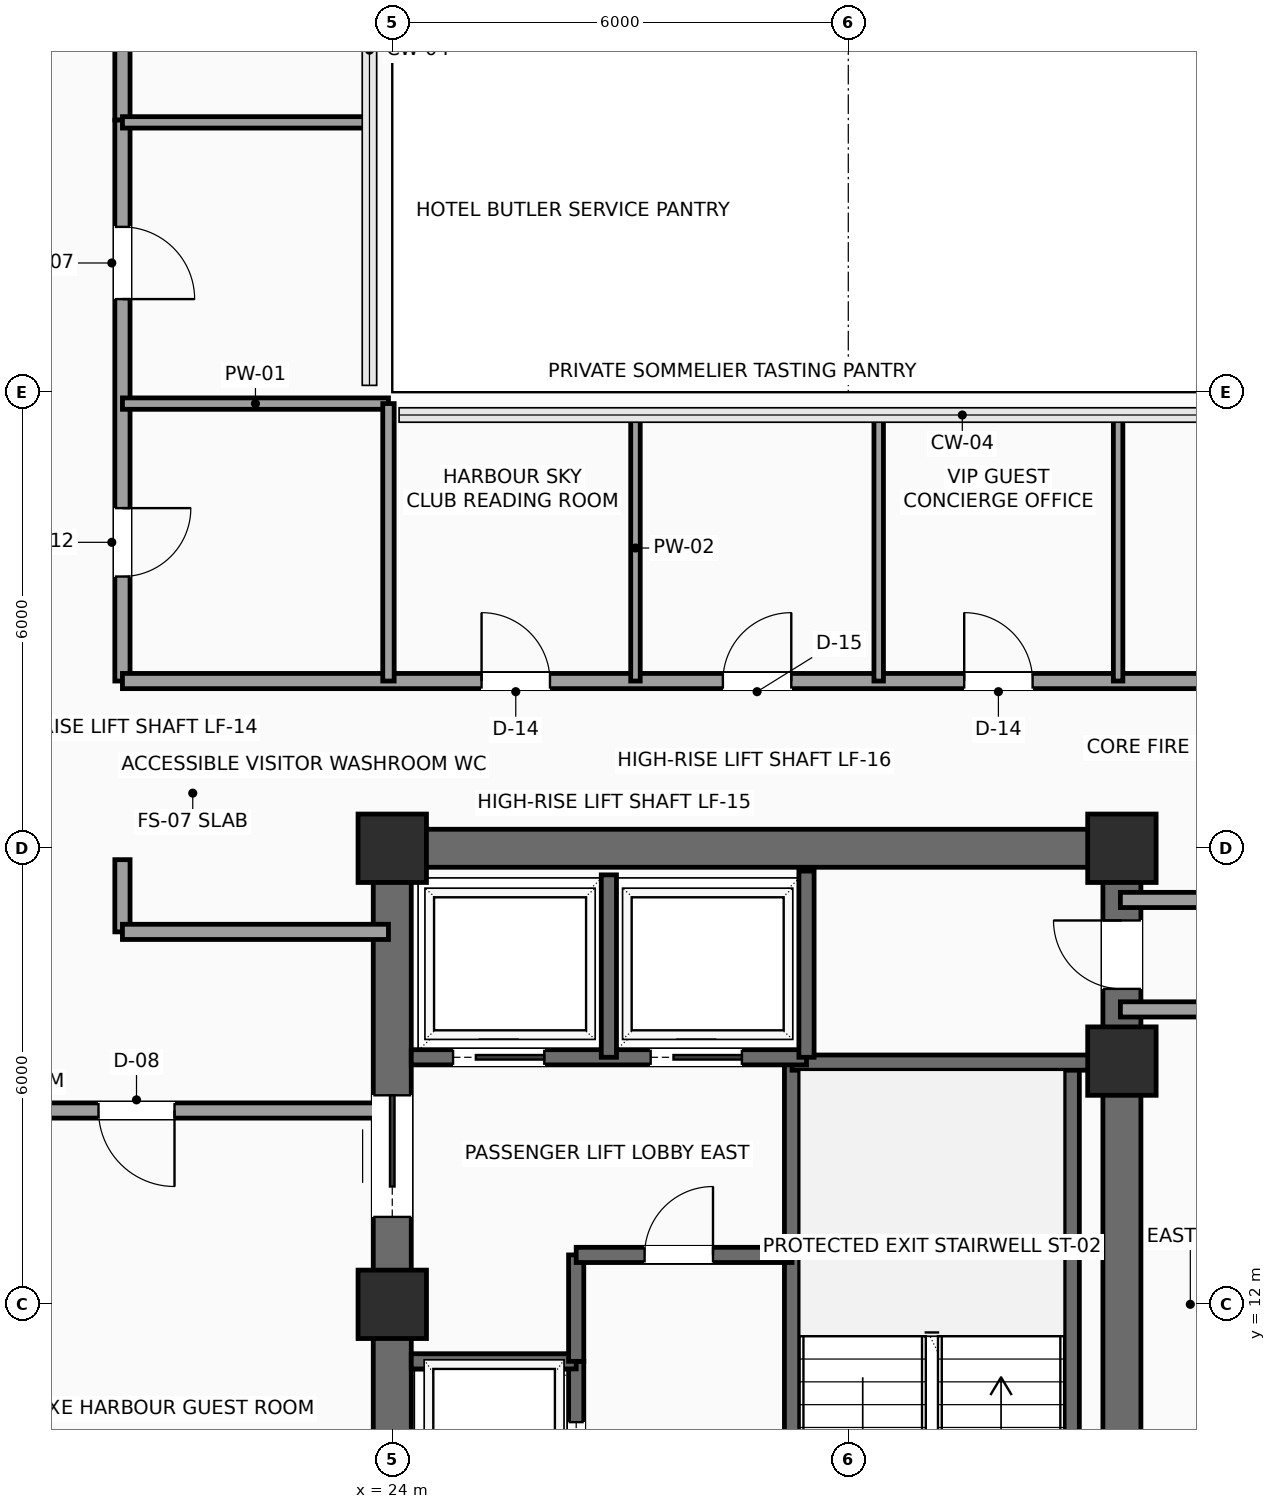
"""IFC4 building model, lengths in metres.
Left out: names, types, materials, properties, quantities, classifications, styles, units other than length and angle.
Written with IfcOpenShell. Run it as: python <this file> out.ifc"""

import sys

from ifc_helpers import new_model, si_unit, direction, frame, frame_2d, origin, origin_2d, place, context, subcontext, project, spatial, rectangle, extrude, element, fill, save


model = new_model("IFC4")
c1 = context("Model", 3, precision=1e-05, world=origin(), true_north=direction((0.0, 1.0)))
c2 = subcontext(c1, "Body", "Model", "MODEL_VIEW")
j1 = project(units=[si_unit("LENGTHUNIT", "METRE"), si_unit("PLANEANGLEUNIT", "RADIAN")], contexts=[c1])
p1 = place(None, origin())
s1 = spatial("IfcSite", under=j1, at=p1, CompositionType="ELEMENT")
p2 = place(p1, origin())
s2 = spatial("IfcBuilding", under=s1, at=p2, CompositionType="ELEMENT")
p3 = place(p2, frame((0.0, 0.0, 212.4)))
s3 = spatial("IfcBuildingStorey", under=s2, at=p3, CompositionType="ELEMENT", Elevation=212.4)
for number, where, z_axis, x_axis in (
    (1, (24.0, 12.0, 0.0), (0.0, 0.0, 1.0), (1.0, 0.0, 0.0)),
    (2, (24.0, 18.0, 0.0), (0.0, 0.0, 1.0), (1.0, 0.0, 0.0)),
    (3, (33.6, 15.2, 0.0), (0.0, 0.0, 1.0), (1.0, 0.0, 0.0)),
    (4, (33.6, 18.0, 0.0), (0.0, 0.0, 1.0), (1.0, 0.0, 0.0)),
):
    element("IfcColumn", number, at=place(p3, frame(where, z_axis=z_axis, x_axis=x_axis)), inside=s3, PredefinedType="COLUMN", context=c2, shape_type="SweptSolid", body=[
        extrude(rectangle(XDim=0.9, YDim=0.9, at=origin_2d()), origin(), (0.0, 0.0, 1.0), 3.75),
    ])
p4 = place(p3, frame((24.0, 18.0, 0.0), z_axis=(0.0, 0.0, 1.0), x_axis=(1.0, 0.0, 0.0)))
e5 = element("IfcWall", 5, at=p4, inside=s3, PredefinedType="SHEAR", context=c2, shape_type="SweptSolid", body=[
    extrude(rectangle(XDim=9.6, YDim=0.5, at=frame_2d((4.8, 0.0))), origin(), (0.0, 0.0, 1.0), 3.54),
])
p5 = place(p3, frame((24.0, 6.0, 0.0), z_axis=(0.0, 0.0, 1.0), x_axis=(0.0, 1.0, 0.0)))
e6 = element("IfcWall", 6, at=p5, inside=s3, PredefinedType="SHEAR", context=c2, shape_type="SweptSolid", body=[
    extrude(rectangle(XDim=12.0, YDim=0.5, at=frame_2d((6.0, 0.0))), origin(), (0.0, 0.0, 1.0), 3.54),
])
p6 = place(p5, frame((7.15, 0.0, 0.0)))
e7 = element("IfcOpeningElement", 7, at=p6, cuts=e6, PredefinedType="OPENING", context=c2, shape_type="SweptSolid", body=[
    extrude(rectangle(XDim=1.6, YDim=2.3, at=frame_2d((0.8, 1.15))), frame((0.0, 0.26, 0.0), z_axis=(0.0, -1.0, 0.0), x_axis=(1.0, 0.0, 0.0)), (0.0, 0.0, 1.0), 0.52),
])
p7 = place(p3, frame((33.6, 6.0, 0.0), z_axis=(0.0, 0.0, 1.0), x_axis=(0.0, 1.0, 0.0)))
e8 = element("IfcWall", 8, at=p7, inside=s3, PredefinedType="SHEAR", context=c2, shape_type="SweptSolid", body=[
    extrude(rectangle(XDim=12.0, YDim=0.5, at=frame_2d((6.0, 0.0))), origin(), (0.0, 0.0, 1.0), 3.54),
])
p8 = place(p7, frame((10.15, 0.0, 0.0)))
e9 = element("IfcOpeningElement", 9, at=p8, cuts=e8, PredefinedType="OPENING", context=c2, shape_type="SweptSolid", body=[
    extrude(rectangle(XDim=0.9, YDim=2.15, at=frame_2d((0.45, 1.075))), frame((0.0, 0.26, 0.0), z_axis=(0.0, -1.0, 0.0), x_axis=(1.0, 0.0, 0.0)), (0.0, 0.0, 1.0), 0.52),
])
p9 = place(p3, frame((29.26, 6.3, 0.0), z_axis=(0.0, 0.0, 1.0), x_axis=(0.0, 1.0, 0.0)))
e10 = element("IfcWall", 10, at=p9, inside=s3, PredefinedType="SHEAR", context=c2, shape_type="SweptSolid", body=[
    extrude(rectangle(XDim=8.88, YDim=0.2, at=frame_2d((4.44, 0.0))), origin(), (0.0, 0.0, 1.0), 3.54),
])
p10 = place(p9, frame((0.35, 0.0, 0.0)))
e11 = element("IfcOpeningElement", 11, at=p10, cuts=e10, PredefinedType="OPENING", context=c2, shape_type="SweptSolid", body=[
    extrude(rectangle(XDim=1.1, YDim=2.2, at=frame_2d((0.55, 1.1))), frame((0.0, 0.11, 0.0), z_axis=(0.0, -1.0, 0.0), x_axis=(1.0, 0.0, 0.0)), (0.0, 0.0, 1.0), 0.22),
])
p11 = place(p3, frame((32.94, 6.3, 0.0), z_axis=(0.0, 0.0, 1.0), x_axis=(0.0, 1.0, 0.0)))
e12 = element("IfcWall", 12, at=p11, inside=s3, PredefinedType="SHEAR", context=c2, shape_type="SweptSolid", body=[
    extrude(rectangle(XDim=8.88, YDim=0.2, at=frame_2d((4.44, 0.0))), origin(), (0.0, 0.0, 1.0), 3.54),
])
p12 = place(p3, frame((29.26, 15.18, 0.0), z_axis=(0.0, 0.0, 1.0), x_axis=(1.0, 0.0, 0.0)))
e13 = element("IfcWall", 13, at=p12, inside=s3, PredefinedType="SHEAR", context=c2, shape_type="SweptSolid", body=[
    extrude(rectangle(XDim=4.04, YDim=0.2, at=frame_2d((2.02, 0.0))), origin(), (0.0, 0.0, 1.0), 3.54),
])
p13 = place(p3, frame((26.42, 6.3, 0.0), z_axis=(0.0, 0.0, 1.0), x_axis=(0.0, 1.0, 0.0)))
e14 = element("IfcWall", 14, at=p13, inside=s3, PredefinedType="SHEAR", context=c2, shape_type="SweptSolid", body=[
    extrude(rectangle(XDim=4.95, YDim=0.2, at=frame_2d((2.475, 0.0))), origin(), (0.0, 0.0, 1.0), 3.54),
])
p14 = place(p13, frame((0.65, 0.0, 0.0)))
e15 = element("IfcOpeningElement", 15, at=p14, cuts=e14, PredefinedType="OPENING", context=c2, shape_type="SweptSolid", body=[
    extrude(rectangle(XDim=1.1, YDim=2.2, at=frame_2d((0.55, 1.1))), frame((0.0, 0.11, 0.0), z_axis=(0.0, -1.0, 0.0), x_axis=(1.0, 0.0, 0.0)), (0.0, 0.0, 1.0), 0.22),
])
p15 = place(p13, frame((3.05, 0.0, 0.0)))
e16 = element("IfcOpeningElement", 16, at=p15, cuts=e14, PredefinedType="OPENING", context=c2, shape_type="SweptSolid", body=[
    extrude(rectangle(XDim=1.1, YDim=2.2, at=frame_2d((0.55, 1.1))), frame((0.0, 0.11, 0.0), z_axis=(0.0, -1.0, 0.0), x_axis=(1.0, 0.0, 0.0)), (0.0, 0.0, 1.0), 0.22),
])
p16 = place(p3, frame((24.25, 11.25, 0.0), z_axis=(0.0, 0.0, 1.0), x_axis=(1.0, 0.0, 0.0)))
e17 = element("IfcWall", 17, at=p16, inside=s3, PredefinedType="SHEAR", context=c2, shape_type="SweptSolid", body=[
    extrude(rectangle(XDim=2.17, YDim=0.2, at=frame_2d((1.085, 0.0))), origin(), (0.0, 0.0, 1.0), 3.54),
])
p17 = place(p3, frame((26.42, 11.25, 0.0), z_axis=(0.0, 0.0, 1.0), x_axis=(0.0, 1.0, 0.0)))
e18 = element("IfcWall", 18, at=p17, inside=s3, PredefinedType="SHEAR", context=c2, shape_type="SweptSolid", body=[
    extrude(rectangle(XDim=1.4, YDim=0.2, at=frame_2d((0.7, 0.0))), origin(), (0.0, 0.0, 1.0), 3.54),
])
p18 = place(p3, frame((26.42, 12.65, 0.0), z_axis=(0.0, 0.0, 1.0), x_axis=(1.0, 0.0, 0.0)))
e19 = element("IfcWall", 19, at=p18, inside=s3, PredefinedType="SHEAR", context=c2, shape_type="SweptSolid", body=[
    extrude(rectangle(XDim=2.84, YDim=0.2, at=frame_2d((1.42, 0.0))), origin(), (0.0, 0.0, 1.0), 3.54),
])
p19 = place(p18, frame((0.9, 0.0, 0.0)))
e20 = element("IfcOpeningElement", 20, at=p19, cuts=e19, PredefinedType="OPENING", context=c2, shape_type="SweptSolid", body=[
    extrude(rectangle(XDim=0.9, YDim=2.15, at=frame_2d((0.45, 1.075))), frame((0.0, 0.11, 0.0), z_axis=(0.0, -1.0, 0.0), x_axis=(1.0, 0.0, 0.0)), (0.0, 0.0, 1.0), 0.22),
])
p20 = place(p3, frame((24.25, 15.25, 0.0), z_axis=(0.0, 0.0, 1.0), x_axis=(1.0, 0.0, 0.0)))
e21 = element("IfcWall", 21, at=p20, inside=s3, PredefinedType="SHEAR", context=c2, shape_type="SweptSolid", body=[
    extrude(rectangle(XDim=5.2, YDim=0.2, at=frame_2d((2.6, 0.0))), origin(), (0.0, 0.0, 1.0), 3.54),
])
p21 = place(p20, frame((0.55, 0.0, 0.0)))
e22 = element("IfcOpeningElement", 22, at=p21, cuts=e21, PredefinedType="OPENING", context=c2, shape_type="SweptSolid", body=[
    extrude(rectangle(XDim=1.2, YDim=2.2, at=frame_2d((0.6, 1.1))), frame((0.0, 0.11, 0.0), z_axis=(0.0, -1.0, 0.0), x_axis=(1.0, 0.0, 0.0)), (0.0, 0.0, 1.0), 0.22),
])
p22 = place(p20, frame((3.15, 0.0, 0.0)))
e23 = element("IfcOpeningElement", 23, at=p22, cuts=e21, PredefinedType="OPENING", context=c2, shape_type="SweptSolid", body=[
    extrude(rectangle(XDim=1.2, YDim=2.2, at=frame_2d((0.6, 1.1))), frame((0.0, 0.11, 0.0), z_axis=(0.0, -1.0, 0.0), x_axis=(1.0, 0.0, 0.0)), (0.0, 0.0, 1.0), 0.22),
])
p23 = place(p3, frame((26.85, 15.25, 0.0), z_axis=(0.0, 0.0, 1.0), x_axis=(0.0, 1.0, 0.0)))
e24 = element("IfcWall", 24, at=p23, inside=s3, PredefinedType="SHEAR", context=c2, shape_type="SweptSolid", body=[
    extrude(rectangle(XDim=2.4, YDim=0.2, at=frame_2d((1.2, 0.0))), origin(), (0.0, 0.0, 1.0), 3.54),
])
p24 = place(p3, frame((29.45, 15.25, 0.0), z_axis=(0.0, 0.0, 1.0), x_axis=(0.0, 1.0, 0.0)))
e25 = element("IfcWall", 25, at=p24, inside=s3, PredefinedType="SHEAR", context=c2, shape_type="SweptSolid", body=[
    extrude(rectangle(XDim=2.45, YDim=0.2, at=frame_2d((1.225, 0.0))), origin(), (0.0, 0.0, 1.0), 3.54),
])
p25 = place(p3, frame((20.45, 30.25, 0.0), z_axis=(0.0, 0.0, 1.0), x_axis=(0.0, -1.0, 0.0)))
e26 = element("IfcWall", 26, at=p25, inside=s3, PredefinedType="PARTITIONING", context=c2, shape_type="SweptSolid", body=[
    extrude(rectangle(XDim=2.67, YDim=0.2, at=frame_2d((1.335, 0.0))), origin(), (0.0, 0.0, 1.0), 3.54),
])
p26 = place(p3, frame((20.45, 27.58, 0.0), z_axis=(0.0, 0.0, 1.0), x_axis=(0.0, -1.0, 0.0)))
e27 = element("IfcWall", 27, at=p26, inside=s3, PredefinedType="PARTITIONING", context=c2, shape_type="SweptSolid", body=[
    extrude(rectangle(XDim=7.38, YDim=0.2, at=frame_2d((3.69, 0.0))), origin(), (0.0, 0.0, 1.0), 3.54),
])
p27 = place(p26, frame((5.105, 0.0, 0.0)))
e28 = element("IfcOpeningElement", 28, at=p27, cuts=e27, PredefinedType="OPENING", context=c2, shape_type="SweptSolid", body=[
    extrude(rectangle(XDim=0.9, YDim=2.1, at=frame_2d((0.45, 1.05))), frame((0.0, 0.11, 0.0), z_axis=(0.0, -1.0, 0.0), x_axis=(1.0, 0.0, 0.0)), (0.0, 0.0, 1.0), 0.22),
])
p28 = place(p26, frame((1.405, 0.0, 0.0)))
e29 = element("IfcOpeningElement", 29, at=p28, cuts=e27, PredefinedType="OPENING", context=c2, shape_type="SweptSolid", body=[
    extrude(rectangle(XDim=0.95, YDim=2.15, at=frame_2d((0.475, 1.075))), frame((0.0, 0.11, 0.0), z_axis=(0.0, -1.0, 0.0), x_axis=(1.0, 0.0, 0.0)), (0.0, 0.0, 1.0), 0.22),
])
p29 = place(p3, frame((20.45, 20.2, 0.0), z_axis=(0.0, 0.0, 1.0), x_axis=(1.0, 0.0, 0.0)))
e30 = element("IfcWall", 30, at=p29, inside=s3, PredefinedType="PARTITIONING", context=c2, shape_type="SweptSolid", body=[
    extrude(rectangle(XDim=15.7, YDim=0.2, at=frame_2d((7.85, 0.0))), origin(), (0.0, 0.0, 1.0), 3.54),
])
p30 = place(p29, frame((4.725, 0.0, 0.0)))
e31 = element("IfcOpeningElement", 31, at=p30, cuts=e30, PredefinedType="OPENING", context=c2, shape_type="SweptSolid", body=[
    extrude(rectangle(XDim=0.9, YDim=2.1, at=frame_2d((0.45, 1.05))), frame((0.0, 0.11, 0.0), z_axis=(0.0, -1.0, 0.0), x_axis=(1.0, 0.0, 0.0)), (0.0, 0.0, 1.0), 0.22),
])
p31 = place(p29, frame((7.9, 0.0, 0.0)))
e32 = element("IfcOpeningElement", 32, at=p31, cuts=e30, PredefinedType="OPENING", context=c2, shape_type="SweptSolid", body=[
    extrude(rectangle(XDim=0.9, YDim=2.1, at=frame_2d((0.45, 1.05))), frame((0.0, 0.11, 0.0), z_axis=(0.0, -1.0, 0.0), x_axis=(1.0, 0.0, 0.0)), (0.0, 0.0, 1.0), 0.22),
])
p32 = place(p29, frame((11.075, 0.0, 0.0)))
e33 = element("IfcOpeningElement", 33, at=p32, cuts=e30, PredefinedType="OPENING", context=c2, shape_type="SweptSolid", body=[
    extrude(rectangle(XDim=0.9, YDim=2.1, at=frame_2d((0.45, 1.05))), frame((0.0, 0.11, 0.0), z_axis=(0.0, -1.0, 0.0), x_axis=(1.0, 0.0, 0.0)), (0.0, 0.0, 1.0), 0.22),
])
for number, where, z_axis, x_axis in (
    (34, (36.15, 15.88, 0.0), (0.0, 0.0, 1.0), (-1.0, 0.0, 0.0)),
    (35, (33.58, 17.32, 0.0), (0.0, 0.0, 1.0), (1.0, 0.0, 0.0)),
):
    element("IfcWall", number, at=place(p3, frame(where, z_axis=z_axis, x_axis=x_axis)), inside=s3, PredefinedType="PARTITIONING", context=c2, shape_type="SweptSolid", body=[
        extrude(rectangle(XDim=2.57, YDim=0.2, at=frame_2d((1.285, 0.0))), origin(), (0.0, 0.0, 1.0), 3.54),
    ])
p33 = place(p3, frame((20.45, 17.85, 0.0), z_axis=(0.0, 0.0, 1.0), x_axis=(0.0, -1.0, 0.0)))
e36 = element("IfcWall", 36, at=p33, inside=s3, PredefinedType="PARTITIONING", context=c2, shape_type="SweptSolid", body=[
    extrude(rectangle(XDim=0.95, YDim=0.2, at=frame_2d((0.475, 0.0))), origin(), (0.0, 0.0, 1.0), 3.54),
])
p34 = place(p3, frame((20.45, 16.9, 0.0), z_axis=(0.0, 0.0, 1.0), x_axis=(1.0, 0.0, 0.0)))
e37 = element("IfcWall", 37, at=p34, inside=s3, PredefinedType="PARTITIONING", context=c2, shape_type="SweptSolid", body=[
    extrude(rectangle(XDim=3.5, YDim=0.2, at=frame_2d((1.75, 0.0))), origin(), (0.0, 0.0, 1.0), 3.54),
])
p35 = place(p3, frame((23.95, 14.55, 0.0), z_axis=(0.0, 0.0, 1.0), x_axis=(-1.0, 0.0, 0.0)))
e38 = element("IfcWall", 38, at=p35, inside=s3, PredefinedType="PARTITIONING", context=c2, shape_type="SweptSolid", body=[
    extrude(rectangle(XDim=9.0, YDim=0.2, at=frame_2d((4.5, 0.0))), origin(), (0.0, 0.0, 1.0), 3.54),
])
p36 = place(p35, frame((2.815, 0.0, 0.0)))
e39 = element("IfcOpeningElement", 39, at=p36, cuts=e38, PredefinedType="OPENING", context=c2, shape_type="SweptSolid", body=[
    extrude(rectangle(XDim=1.0, YDim=2.2, at=frame_2d((0.5, 1.1))), frame((0.0, 0.11, 0.0), z_axis=(0.0, -1.0, 0.0), x_axis=(1.0, 0.0, 0.0)), (0.0, 0.0, 1.0), 0.22),
])
p37 = place(p3, frame((20.45, 23.85, 0.0), z_axis=(0.0, 0.0, 1.0), x_axis=(1.0, 0.0, 0.0)))
e40 = element("IfcWall", 40, at=p37, inside=s3, PredefinedType="PARTITIONING", context=c2, shape_type="SweptSolid", body=[
    extrude(rectangle(XDim=3.5, YDim=0.15, at=frame_2d((1.75, 0.0))), origin(), (0.0, 0.0, 1.0), 3.54),
])
p38 = place(p3, frame((23.95, 20.2, 0.0), z_axis=(0.0, 0.0, 1.0), x_axis=(0.0, 1.0, 0.0)))
e41 = element("IfcWall", 41, at=p38, inside=s3, PredefinedType="PARTITIONING", context=c2, shape_type="SweptSolid", body=[
    extrude(rectangle(XDim=3.65, YDim=0.15, at=frame_2d((1.825, 0.0))), origin(), (0.0, 0.0, 1.0), 3.54),
])
p39 = place(p3, frame((20.45, 27.55, 0.0), z_axis=(0.0, 0.0, 1.0), x_axis=(1.0, 0.0, 0.0)))
e42 = element("IfcWall", 42, at=p39, inside=s3, PredefinedType="PARTITIONING", context=c2, shape_type="SweptSolid", body=[
    extrude(rectangle(XDim=3.25, YDim=0.15, at=frame_2d((1.625, 0.0))), origin(), (0.0, 0.0, 1.0), 3.54),
])
for number, where, z_axis, x_axis in (
    (43, (27.2, 20.2, 0.0), (0.0, 0.0, 1.0), (0.0, 1.0, 0.0)),
    (44, (30.4, 20.2, 0.0), (0.0, 0.0, 1.0), (0.0, 1.0, 0.0)),
    (45, (33.55, 20.2, 0.0), (0.0, 0.0, 1.0), (0.0, 1.0, 0.0)),
):
    element("IfcWall", number, at=place(p3, frame(where, z_axis=z_axis, x_axis=x_axis)), inside=s3, PredefinedType="PARTITIONING", context=c2, shape_type="SweptSolid", body=[
        extrude(rectangle(XDim=3.5, YDim=0.125, at=frame_2d((1.75, 0.0))), origin(), (0.0, 0.0, 1.0), 3.54),
    ])
p40 = place(p6, origin())
e46 = element("IfcDoor", 46, at=p40, inside=s3, OperationType="DOUBLE_DOOR_SLIDING", PredefinedType="DOOR", context=c2, shape_type="SweptSolid", body=[
    extrude(rectangle(XDim=1.6, YDim=2.3, at=frame_2d((0.8, 1.15))), frame((0.0, 0.025, 0.0), z_axis=(0.0, -1.0, 0.0), x_axis=(1.0, 0.0, 0.0)), (0.0, 0.0, 1.0), 0.05),
])
fill(e7, e46)
p41 = place(p8, origin())
e47 = element("IfcDoor", 47, at=p41, inside=s3, OperationType="SINGLE_SWING_RIGHT", PredefinedType="DOOR", context=c2, shape_type="SweptSolid", body=[
    extrude(rectangle(XDim=0.9, YDim=2.15, at=frame_2d((0.45, 1.075))), frame((0.0, 0.025, 0.0), z_axis=(0.0, -1.0, 0.0), x_axis=(1.0, 0.0, 0.0)), (0.0, 0.0, 1.0), 0.05),
])
fill(e9, e47)
p42 = place(p15, origin())
e48 = element("IfcDoor", 48, at=p42, inside=s3, OperationType="SLIDING_TO_LEFT", PredefinedType="DOOR", context=c2, shape_type="SweptSolid", body=[
    extrude(rectangle(XDim=1.1, YDim=2.2, at=frame_2d((0.55, 1.1))), frame((0.0, 0.025, 0.0), z_axis=(0.0, -1.0, 0.0), x_axis=(1.0, 0.0, 0.0)), (0.0, 0.0, 1.0), 0.05),
])
fill(e16, e48)
p43 = place(p19, origin())
e49 = element("IfcDoor", 49, at=p43, inside=s3, OperationType="SINGLE_SWING_RIGHT", PredefinedType="DOOR", context=c2, shape_type="SweptSolid", body=[
    extrude(rectangle(XDim=0.9, YDim=2.15, at=frame_2d((0.45, 1.075))), frame((0.0, 0.025, 0.0), z_axis=(0.0, -1.0, 0.0), x_axis=(1.0, 0.0, 0.0)), (0.0, 0.0, 1.0), 0.05),
])
fill(e20, e49)
p44 = place(p21, origin())
e50 = element("IfcDoor", 50, at=p44, inside=s3, OperationType="SLIDING_TO_RIGHT", PredefinedType="DOOR", context=c2, shape_type="SweptSolid", body=[
    extrude(rectangle(XDim=1.2, YDim=2.2, at=frame_2d((0.6, 1.1))), frame((0.0, 0.025, 0.0), z_axis=(0.0, -1.0, 0.0), x_axis=(1.0, 0.0, 0.0)), (0.0, 0.0, 1.0), 0.05),
])
fill(e22, e50)
p45 = place(p22, origin())
e51 = element("IfcDoor", 51, at=p45, inside=s3, OperationType="SLIDING_TO_RIGHT", PredefinedType="DOOR", context=c2, shape_type="SweptSolid", body=[
    extrude(rectangle(XDim=1.2, YDim=2.2, at=frame_2d((0.6, 1.1))), frame((0.0, 0.025, 0.0), z_axis=(0.0, -1.0, 0.0), x_axis=(1.0, 0.0, 0.0)), (0.0, 0.0, 1.0), 0.05),
])
fill(e23, e51)
p46 = place(p27, origin())
e52 = element("IfcDoor", 52, at=p46, inside=s3, OperationType="SINGLE_SWING_LEFT", PredefinedType="DOOR", context=c2, shape_type="SweptSolid", body=[
    extrude(rectangle(XDim=0.9, YDim=2.1, at=frame_2d((0.45, 1.05))), frame((0.0, 0.025, 0.0), z_axis=(0.0, -1.0, 0.0), x_axis=(1.0, 0.0, 0.0)), (0.0, 0.0, 1.0), 0.05),
])
fill(e28, e52)
p47 = place(p28, origin())
e53 = element("IfcDoor", 53, at=p47, inside=s3, OperationType="SINGLE_SWING_RIGHT", PredefinedType="DOOR", context=c2, shape_type="SweptSolid", body=[
    extrude(rectangle(XDim=0.95, YDim=2.15, at=frame_2d((0.475, 1.075))), frame((0.0, 0.025, 0.0), z_axis=(0.0, -1.0, 0.0), x_axis=(1.0, 0.0, 0.0)), (0.0, 0.0, 1.0), 0.05),
])
fill(e29, e53)
p48 = place(p30, origin())
e54 = element("IfcDoor", 54, at=p48, inside=s3, OperationType="SINGLE_SWING_LEFT", PredefinedType="DOOR", context=c2, shape_type="SweptSolid", body=[
    extrude(rectangle(XDim=0.9, YDim=2.1, at=frame_2d((0.45, 1.05))), frame((0.0, 0.025, 0.0), z_axis=(0.0, -1.0, 0.0), x_axis=(1.0, 0.0, 0.0)), (0.0, 0.0, 1.0), 0.05),
])
fill(e31, e54)
p49 = place(p31, origin())
e55 = element("IfcDoor", 55, at=p49, inside=s3, OperationType="SINGLE_SWING_RIGHT", PredefinedType="DOOR", context=c2, shape_type="SweptSolid", body=[
    extrude(rectangle(XDim=0.9, YDim=2.1, at=frame_2d((0.45, 1.05))), frame((0.0, 0.025, 0.0), z_axis=(0.0, -1.0, 0.0), x_axis=(1.0, 0.0, 0.0)), (0.0, 0.0, 1.0), 0.05),
])
fill(e32, e55)
p50 = place(p32, origin())
e56 = element("IfcDoor", 56, at=p50, inside=s3, OperationType="SINGLE_SWING_LEFT", PredefinedType="DOOR", context=c2, shape_type="SweptSolid", body=[
    extrude(rectangle(XDim=0.9, YDim=2.1, at=frame_2d((0.45, 1.05))), frame((0.0, 0.025, 0.0), z_axis=(0.0, -1.0, 0.0), x_axis=(1.0, 0.0, 0.0)), (0.0, 0.0, 1.0), 0.05),
])
fill(e33, e56)
p51 = place(p36, origin())
e57 = element("IfcDoor", 57, at=p51, inside=s3, OperationType="SINGLE_SWING_LEFT", PredefinedType="DOOR", context=c2, shape_type="SweptSolid", body=[
    extrude(rectangle(XDim=1.0, YDim=2.2, at=frame_2d((0.5, 1.1))), frame((0.0, 0.025, 0.0), z_axis=(0.0, -1.0, 0.0), x_axis=(1.0, 0.0, 0.0)), (0.0, 0.0, 1.0), 0.05),
])
fill(e39, e57)
save(model, sys.argv[1])
